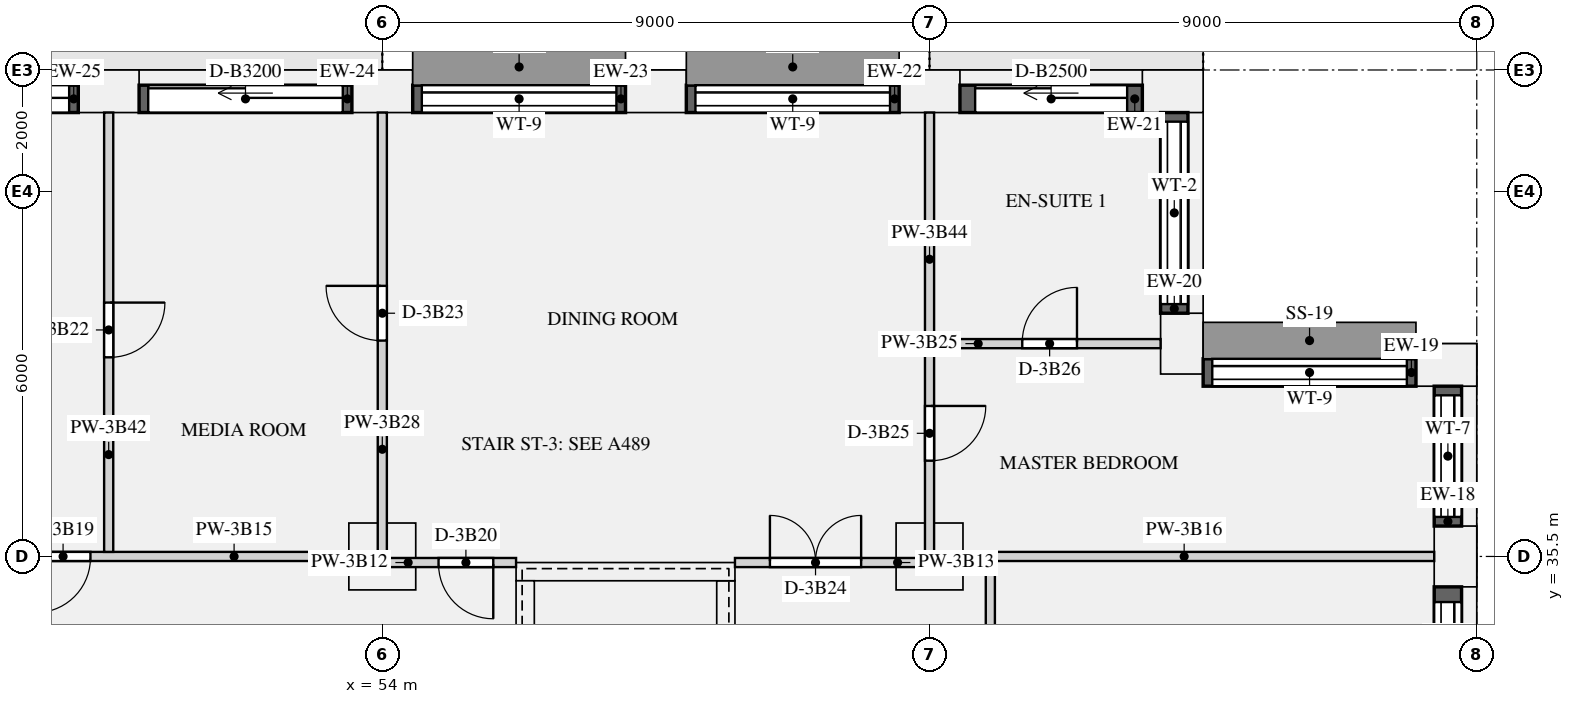
"""IFC4 building model, lengths in metres.
Left out: names, types, materials, properties, quantities, classifications, styles, units other than length and angle.
Written with IfcOpenShell. Run it as: python <this file> out.ifc"""

import sys

from ifc_helpers import new_model, si_unit, direction, frame, frame_2d, origin, origin_2d, place, context, subcontext, project, spatial, rectangle, extrude, element, fill, save


model = new_model("IFC4")
c1 = context("Model", 3, precision=1e-05, world=origin(), true_north=direction((0.0, 1.0)))
c2 = subcontext(c1, "Body", "Model", "MODEL_VIEW")
j1 = project(units=[si_unit("LENGTHUNIT", "METRE"), si_unit("PLANEANGLEUNIT", "RADIAN")], contexts=[c1])
p1 = place(None, origin())
s1 = spatial("IfcSite", under=j1, at=p1, CompositionType="ELEMENT")
p2 = place(p1, origin())
s2 = spatial("IfcBuilding", under=s1, at=p2, CompositionType="ELEMENT")
p3 = place(p2, frame((0.0, 0.0, 150.75)))
s3 = spatial("IfcBuildingStorey", under=s2, at=p3, CompositionType="ELEMENT", Elevation=150.75)
for number, where, z_axis, x_axis in (
    (1, (71.65, 35.5, 0.0), (0.0, 0.0, 1.0), (0.0, 1.0, 0.0)),
    (2, (71.5, 38.65, 0.0), (0.0, 0.0, 1.0), (-1.0, 0.0, 0.0)),
    (3, (67.15, 39.0, 0.0), (0.0, 0.0, 1.0), (0.0, 1.0, 0.0)),
    (4, (67.0, 43.15, 0.0), (0.0, 0.0, 1.0), (-1.0, 0.0, 0.0)),
    (5, (63.0, 43.15, 0.0), (0.0, 0.0, 1.0), (-1.0, 0.0, 0.0)),
    (6, (58.5, 43.15, 0.0), (0.0, 0.0, 1.0), (-1.0, 0.0, 0.0)),
    (7, (54.0, 43.15, 0.0), (0.0, 0.0, 1.0), (-1.0, 0.0, 0.0)),
    (8, (49.5, 43.15, 0.0), (0.0, 0.0, 1.0), (-1.0, 0.0, 0.0)),
):
    element("IfcColumn", number, at=place(p3, frame(where, z_axis=z_axis, x_axis=x_axis)), inside=s3, PredefinedType="USERDEFINED", context=c2, shape_type="SweptSolid", body=[
        extrude(rectangle(XDim=1.0, YDim=0.7, at=origin_2d()), origin(), (0.0, 0.0, 1.0), 3.15),
    ])
for number, where, z_axis, x_axis in (
    (9, (54.0, 35.5, 0.0), (0.0, 0.0, 1.0), (1.0, 0.0, 0.0)),
    (10, (63.0, 35.5, 0.0), (0.0, 0.0, 1.0), (1.0, 0.0, 0.0)),
):
    element("IfcColumn", number, at=place(p3, frame(where, z_axis=z_axis, x_axis=x_axis)), inside=s3, PredefinedType="COLUMN", context=c2, shape_type="SweptSolid", body=[
        extrude(rectangle(XDim=1.1, YDim=1.1, at=origin_2d()), origin(), (0.0, 0.0, 1.0), 3.15),
    ])
p4 = place(p3, frame((56.2, 35.25, 0.0), z_axis=(0.0, 0.0, 1.0), x_axis=(1.0, 0.0, 0.0)))
e11 = element("IfcWall", 11, at=p4, inside=s3, PredefinedType="SHEAR", context=c2, shape_type="SweptSolid", body=[
    extrude(rectangle(XDim=3.6, YDim=0.3, at=frame_2d((1.8, 0.0))), origin(), (0.0, 0.0, 1.0), 3.15),
])
for number, where, z_axis, x_axis in (
    (12, (56.35, 27.3, 0.0), (0.0, 0.0, 1.0), (0.0, 1.0, 0.0)),
    (13, (59.65, 27.3, 0.0), (0.0, 0.0, 1.0), (0.0, 1.0, 0.0)),
):
    element("IfcWall", number, at=place(p3, frame(where, z_axis=z_axis, x_axis=x_axis)), inside=s3, PredefinedType="SHEAR", context=c2, shape_type="SweptSolid", body=[
        extrude(rectangle(XDim=7.8, YDim=0.3, at=frame_2d((3.9, 0.0))), origin(), (0.0, 0.0, 1.0), 3.15),
    ])
p5 = place(p3, frame((71.525, 32.5, 0.9), z_axis=(0.0, 0.0, 1.0), x_axis=(0.0, 1.0, 0.0)))
e14 = element("IfcWall", 14, at=p5, inside=s3, PredefinedType="SOLIDWALL", context=c2, shape_type="SweptSolid", body=[
    extrude(rectangle(XDim=2.5, YDim=0.45, at=frame_2d((1.25, 0.0))), origin(), (0.0, 0.0, 1.0), 1.93),
])
p6 = place(p5, frame((0.25, 0.0, 0.15)))
e15 = element("IfcOpeningElement", 15, at=p6, cuts=e14, PredefinedType="OPENING", context=c2, shape_type="SweptSolid", body=[
    extrude(rectangle(XDim=2.0, YDim=1.5, at=frame_2d((1.0, 0.75))), frame((0.0, 0.235, 0.0), z_axis=(0.0, -1.0, 0.0), x_axis=(1.0, 0.0, 0.0)), (0.0, 0.0, 1.0), 0.47),
])
p7 = place(p3, frame((71.525, 36.0, 0.9), z_axis=(0.0, 0.0, 1.0), x_axis=(0.0, 1.0, 0.0)))
e16 = element("IfcWall", 16, at=p7, inside=s3, PredefinedType="SOLIDWALL", context=c2, shape_type="SweptSolid", body=[
    extrude(rectangle(XDim=2.3, YDim=0.45, at=frame_2d((1.15, 0.0))), origin(), (0.0, 0.0, 1.0), 1.93),
])
p8 = place(p7, frame((0.15, 0.0, 0.15)))
e17 = element("IfcOpeningElement", 17, at=p8, cuts=e16, PredefinedType="OPENING", context=c2, shape_type="SweptSolid", body=[
    extrude(rectangle(XDim=2.0, YDim=1.5, at=frame_2d((1.0, 0.75))), frame((0.0, 0.235, 0.0), z_axis=(0.0, -1.0, 0.0), x_axis=(1.0, 0.0, 0.0)), (0.0, 0.0, 1.0), 0.47),
])
p9 = place(p3, frame((71.0, 38.525, 0.9), z_axis=(0.0, 0.0, 1.0), x_axis=(-1.0, 0.0, 0.0)))
e18 = element("IfcWall", 18, at=p9, inside=s3, PredefinedType="SOLIDWALL", context=c2, shape_type="SweptSolid", body=[
    extrude(rectangle(XDim=3.5, YDim=0.45, at=frame_2d((1.75, 0.0))), origin(), (0.0, 0.0, 1.0), 1.93),
])
p10 = place(p9, frame((0.15, 0.0, 0.15)))
e19 = element("IfcOpeningElement", 19, at=p10, cuts=e18, PredefinedType="OPENING", context=c2, shape_type="SweptSolid", body=[
    extrude(rectangle(XDim=3.2, YDim=1.5, at=frame_2d((1.6, 0.75))), frame((0.0, 0.235, 0.0), z_axis=(0.0, -1.0, 0.0), x_axis=(1.0, 0.0, 0.0)), (0.0, 0.0, 1.0), 0.47),
])
p11 = place(p3, frame((67.025, 39.5, 0.9), z_axis=(0.0, 0.0, 1.0), x_axis=(0.0, 1.0, 0.0)))
e20 = element("IfcWall", 20, at=p11, inside=s3, PredefinedType="SOLIDWALL", context=c2, shape_type="SweptSolid", body=[
    extrude(rectangle(XDim=3.3, YDim=0.45, at=frame_2d((1.65, 0.0))), origin(), (0.0, 0.0, 1.0), 1.93),
])
p12 = place(p11, frame((0.15, 0.0, 0.15)))
e21 = element("IfcOpeningElement", 21, at=p12, cuts=e20, PredefinedType="OPENING", context=c2, shape_type="SweptSolid", body=[
    extrude(rectangle(XDim=3.0, YDim=1.5, at=frame_2d((1.5, 0.75))), frame((0.0, 0.235, 0.0), z_axis=(0.0, -1.0, 0.0), x_axis=(1.0, 0.0, 0.0)), (0.0, 0.0, 1.0), 0.47),
])
p13 = place(p3, frame((66.5, 43.025, 0.0), z_axis=(0.0, 0.0, 1.0), x_axis=(-1.0, 0.0, 0.0)))
e22 = element("IfcWall", 22, at=p13, inside=s3, PredefinedType="SOLIDWALL", context=c2, shape_type="SweptSolid", body=[
    extrude(rectangle(XDim=3.0, YDim=0.45, at=frame_2d((1.5, 0.0))), origin(), (0.0, 0.0, 1.0), 2.83),
])
p14 = place(p13, frame((0.25, 0.0, 0.0)))
e23 = element("IfcOpeningElement", 23, at=p14, cuts=e22, PredefinedType="OPENING", context=c2, shape_type="SweptSolid", body=[
    extrude(rectangle(XDim=2.5, YDim=2.3, at=frame_2d((1.25, 1.15))), frame((0.0, 0.235, 0.0), z_axis=(0.0, -1.0, 0.0), x_axis=(1.0, 0.0, 0.0)), (0.0, 0.0, 1.0), 0.47),
])
p15 = place(p3, frame((62.5, 43.025, 0.9), z_axis=(0.0, 0.0, 1.0), x_axis=(-1.0, 0.0, 0.0)))
e24 = element("IfcWall", 24, at=p15, inside=s3, PredefinedType="SOLIDWALL", context=c2, shape_type="SweptSolid", body=[
    extrude(rectangle(XDim=3.5, YDim=0.45, at=frame_2d((1.75, 0.0))), origin(), (0.0, 0.0, 1.0), 1.93),
])
p16 = place(p15, frame((0.15, 0.0, 0.15)))
e25 = element("IfcOpeningElement", 25, at=p16, cuts=e24, PredefinedType="OPENING", context=c2, shape_type="SweptSolid", body=[
    extrude(rectangle(XDim=3.2, YDim=1.5, at=frame_2d((1.6, 0.75))), frame((0.0, 0.235, 0.0), z_axis=(0.0, -1.0, 0.0), x_axis=(1.0, 0.0, 0.0)), (0.0, 0.0, 1.0), 0.47),
])
p17 = place(p3, frame((58.0, 43.025, 0.9), z_axis=(0.0, 0.0, 1.0), x_axis=(-1.0, 0.0, 0.0)))
e26 = element("IfcWall", 26, at=p17, inside=s3, PredefinedType="SOLIDWALL", context=c2, shape_type="SweptSolid", body=[
    extrude(rectangle(XDim=3.5, YDim=0.45, at=frame_2d((1.75, 0.0))), origin(), (0.0, 0.0, 1.0), 1.93),
])
p18 = place(p17, frame((0.15, 0.0, 0.15)))
e27 = element("IfcOpeningElement", 27, at=p18, cuts=e26, PredefinedType="OPENING", context=c2, shape_type="SweptSolid", body=[
    extrude(rectangle(XDim=3.2, YDim=1.5, at=frame_2d((1.6, 0.75))), frame((0.0, 0.235, 0.0), z_axis=(0.0, -1.0, 0.0), x_axis=(1.0, 0.0, 0.0)), (0.0, 0.0, 1.0), 0.47),
])
p19 = place(p3, frame((53.5, 43.025, 0.0), z_axis=(0.0, 0.0, 1.0), x_axis=(-1.0, 0.0, 0.0)))
e28 = element("IfcWall", 28, at=p19, inside=s3, PredefinedType="SOLIDWALL", context=c2, shape_type="SweptSolid", body=[
    extrude(rectangle(XDim=3.5, YDim=0.45, at=frame_2d((1.75, 0.0))), origin(), (0.0, 0.0, 1.0), 2.83),
])
p20 = place(p19, frame((0.15, 0.0, 0.0)))
e29 = element("IfcOpeningElement", 29, at=p20, cuts=e28, PredefinedType="OPENING", context=c2, shape_type="SweptSolid", body=[
    extrude(rectangle(XDim=3.2, YDim=2.3, at=frame_2d((1.6, 1.15))), frame((0.0, 0.235, 0.0), z_axis=(0.0, -1.0, 0.0), x_axis=(1.0, 0.0, 0.0)), (0.0, 0.0, 1.0), 0.47),
])
p21 = place(p3, frame((49.0, 43.025, 0.0), z_axis=(0.0, 0.0, 1.0), x_axis=(-1.0, 0.0, 0.0)))
e30 = element("IfcWall", 30, at=p21, inside=s3, PredefinedType="SOLIDWALL", context=c2, shape_type="SweptSolid", body=[
    extrude(rectangle(XDim=3.5, YDim=0.45, at=frame_2d((1.75, 0.0))), origin(), (0.0, 0.0, 1.0), 2.83),
])
p22 = place(p21, frame((0.15, 0.0, 0.0)))
e31 = element("IfcOpeningElement", 31, at=p22, cuts=e30, PredefinedType="OPENING", context=c2, shape_type="SweptSolid", body=[
    extrude(rectangle(XDim=3.2, YDim=2.3, at=frame_2d((1.6, 1.15))), frame((0.0, 0.235, 0.0), z_axis=(0.0, -1.0, 0.0), x_axis=(1.0, 0.0, 0.0)), (0.0, 0.0, 1.0), 0.47),
])
p23 = place(p3, frame((53.925, 35.4, 0.0), z_axis=(0.0, 0.0, 1.0), x_axis=(1.0, 0.0, 0.0)))
e32 = element("IfcWall", 32, at=p23, inside=s3, PredefinedType="PARTITIONING", context=c2, shape_type="SweptSolid", body=[
    extrude(rectangle(XDim=2.275, YDim=0.15, at=frame_2d((1.137, 0.0))), origin(), (0.0, 0.0, 1.0), 2.83),
])
p24 = place(p23, frame((1.0, 0.0, 0.0)))
e33 = element("IfcOpeningElement", 33, at=p24, cuts=e32, PredefinedType="OPENING", context=c2, shape_type="SweptSolid", body=[
    extrude(rectangle(XDim=0.9, YDim=2.1, at=frame_2d((0.45, 1.05))), frame((0.0, 0.085, 0.0), z_axis=(0.0, -1.0, 0.0), x_axis=(1.0, 0.0, 0.0)), (0.0, 0.0, 1.0), 0.17),
])
p25 = place(p3, frame((59.8, 35.4, 0.0), z_axis=(0.0, 0.0, 1.0), x_axis=(1.0, 0.0, 0.0)))
e34 = element("IfcWall", 34, at=p25, inside=s3, PredefinedType="PARTITIONING", context=c2, shape_type="SweptSolid", body=[
    extrude(rectangle(XDim=3.275, YDim=0.15, at=frame_2d((1.637, 0.0))), origin(), (0.0, 0.0, 1.0), 2.83),
])
p26 = place(p25, frame((0.575, 0.0, 0.0)))
e35 = element("IfcOpeningElement", 35, at=p26, cuts=e34, PredefinedType="OPENING", context=c2, shape_type="SweptSolid", body=[
    extrude(rectangle(XDim=1.5, YDim=2.1, at=frame_2d((0.75, 1.05))), frame((0.0, 0.085, 0.0), z_axis=(0.0, -1.0, 0.0), x_axis=(1.0, 0.0, 0.0)), (0.0, 0.0, 1.0), 0.17),
])
p27 = place(p3, frame((45.0, 35.5, 0.0), z_axis=(0.0, 0.0, 1.0), x_axis=(1.0, 0.0, 0.0)))
e36 = element("IfcWall", 36, at=p27, inside=s3, PredefinedType="PARTITIONING", context=c2, shape_type="SweptSolid", body=[
    extrude(rectangle(XDim=8.925, YDim=0.15, at=frame_2d((4.462, 0.0))), origin(), (0.0, 0.0, 1.0), 2.83),
])
p28 = place(p27, frame((3.3, 0.0, 0.0)))
e37 = element("IfcOpeningElement", 37, at=p28, cuts=e36, PredefinedType="OPENING", context=c2, shape_type="SweptSolid", body=[
    extrude(rectangle(XDim=0.9, YDim=2.1, at=frame_2d((0.45, 1.05))), frame((0.0, 0.085, 0.0), z_axis=(0.0, -1.0, 0.0), x_axis=(1.0, 0.0, 0.0)), (0.0, 0.0, 1.0), 0.17),
])
p29 = place(p27, frame((1.025, 0.0, 0.0)))
e38 = element("IfcOpeningElement", 38, at=p29, cuts=e36, PredefinedType="OPENING", context=c2, shape_type="SweptSolid", body=[
    extrude(rectangle(XDim=1.5, YDim=2.1, at=frame_2d((0.75, 1.05))), frame((0.0, 0.085, 0.0), z_axis=(0.0, -1.0, 0.0), x_axis=(1.0, 0.0, 0.0)), (0.0, 0.0, 1.0), 0.17),
])
p30 = place(p3, frame((63.075, 35.5, 0.0), z_axis=(0.0, 0.0, 1.0), x_axis=(1.0, 0.0, 0.0)))
e39 = element("IfcWall", 39, at=p30, inside=s3, PredefinedType="PARTITIONING", context=c2, shape_type="SweptSolid", body=[
    extrude(rectangle(XDim=8.225, YDim=0.15, at=frame_2d((4.113, 0.0))), origin(), (0.0, 0.0, 1.0), 2.83),
])
p31 = place(p3, frame((63.075, 39.0, 0.0), z_axis=(0.0, 0.0, 1.0), x_axis=(1.0, 0.0, 0.0)))
e40 = element("IfcWall", 40, at=p31, inside=s3, PredefinedType="PARTITIONING", context=c2, shape_type="SweptSolid", body=[
    extrude(rectangle(XDim=3.725, YDim=0.15, at=frame_2d((1.863, 0.0))), origin(), (0.0, 0.0, 1.0), 2.83),
])
p32 = place(p31, frame((1.45, 0.0, 0.0)))
e41 = element("IfcOpeningElement", 41, at=p32, cuts=e40, PredefinedType="OPENING", context=c2, shape_type="SweptSolid", body=[
    extrude(rectangle(XDim=0.9, YDim=2.1, at=frame_2d((0.45, 1.05))), frame((0.0, 0.085, 0.0), z_axis=(0.0, -1.0, 0.0), x_axis=(1.0, 0.0, 0.0)), (0.0, 0.0, 1.0), 0.17),
])
p33 = place(p3, frame((54.0, 35.475, 0.0), z_axis=(0.0, 0.0, 1.0), x_axis=(0.0, 1.0, 0.0)))
e42 = element("IfcWall", 42, at=p33, inside=s3, PredefinedType="PARTITIONING", context=c2, shape_type="SweptSolid", body=[
    extrude(rectangle(XDim=7.325, YDim=0.15, at=frame_2d((3.663, 0.0))), origin(), (0.0, 0.0, 1.0), 2.83),
])
p34 = place(p33, frame((3.575, 0.0, 0.0)))
e43 = element("IfcOpeningElement", 43, at=p34, cuts=e42, PredefinedType="OPENING", context=c2, shape_type="SweptSolid", body=[
    extrude(rectangle(XDim=0.9, YDim=2.1, at=frame_2d((0.45, 1.05))), frame((0.0, 0.085, 0.0), z_axis=(0.0, -1.0, 0.0), x_axis=(1.0, 0.0, 0.0)), (0.0, 0.0, 1.0), 0.17),
])
p35 = place(p3, frame((49.5, 35.575, 0.0), z_axis=(0.0, 0.0, 1.0), x_axis=(0.0, 1.0, 0.0)))
e44 = element("IfcWall", 44, at=p35, inside=s3, PredefinedType="PARTITIONING", context=c2, shape_type="SweptSolid", body=[
    extrude(rectangle(XDim=7.225, YDim=0.15, at=frame_2d((3.613, 0.0))), origin(), (0.0, 0.0, 1.0), 2.83),
])
p36 = place(p35, frame((3.2, 0.0, 0.0)))
e45 = element("IfcOpeningElement", 45, at=p36, cuts=e44, PredefinedType="OPENING", context=c2, shape_type="SweptSolid", body=[
    extrude(rectangle(XDim=0.9, YDim=2.1, at=frame_2d((0.45, 1.05))), frame((0.0, 0.085, 0.0), z_axis=(0.0, -1.0, 0.0), x_axis=(1.0, 0.0, 0.0)), (0.0, 0.0, 1.0), 0.17),
])
p37 = place(p3, frame((63.0, 35.475, 0.0), z_axis=(0.0, 0.0, 1.0), x_axis=(0.0, 1.0, 0.0)))
e46 = element("IfcWall", 46, at=p37, inside=s3, PredefinedType="PARTITIONING", context=c2, shape_type="SweptSolid", body=[
    extrude(rectangle(XDim=7.325, YDim=0.15, at=frame_2d((3.663, 0.0))), origin(), (0.0, 0.0, 1.0), 2.83),
])
p38 = place(p37, frame((1.6, 0.0, 0.0)))
e47 = element("IfcOpeningElement", 47, at=p38, cuts=e46, PredefinedType="OPENING", context=c2, shape_type="SweptSolid", body=[
    extrude(rectangle(XDim=0.9, YDim=2.1, at=frame_2d((0.45, 1.05))), frame((0.0, 0.085, 0.0), z_axis=(0.0, -1.0, 0.0), x_axis=(1.0, 0.0, 0.0)), (0.0, 0.0, 1.0), 0.17),
])
p39 = place(p3, frame((64.0, 12.575, 0.0), z_axis=(0.0, 0.0, 1.0), x_axis=(0.0, 1.0, 0.0)))
e48 = element("IfcWall", 48, at=p39, inside=s3, PredefinedType="PARTITIONING", context=c2, shape_type="SweptSolid", body=[
    extrude(rectangle(XDim=22.85, YDim=0.15, at=frame_2d((11.425, 0.0))), origin(), (0.0, 0.0, 1.0), 2.83),
])
p40 = place(p39, frame((16.55, 0.0, 0.0)))
e49 = element("IfcOpeningElement", 49, at=p40, cuts=e48, PredefinedType="OPENING", context=c2, shape_type="SweptSolid", body=[
    extrude(rectangle(XDim=1.5, YDim=2.1, at=frame_2d((0.75, 1.05))), frame((0.0, 0.085, 0.0), z_axis=(0.0, -1.0, 0.0), x_axis=(1.0, 0.0, 0.0)), (0.0, 0.0, 1.0), 0.17),
])
p41 = place(p39, frame((4.925, 0.0, 0.0)))
e50 = element("IfcOpeningElement", 50, at=p41, cuts=e48, PredefinedType="OPENING", context=c2, shape_type="SweptSolid", body=[
    extrude(rectangle(XDim=1.5, YDim=2.1, at=frame_2d((0.75, 1.05))), frame((0.0, 0.085, 0.0), z_axis=(0.0, -1.0, 0.0), x_axis=(1.0, 0.0, 0.0)), (0.0, 0.0, 1.0), 0.17),
])
p42 = place(p6, origin())
e51 = element("IfcWindow", 51, at=p42, inside=s3, PartitioningType="SINGLE_PANEL", PredefinedType="WINDOW", context=c2, shape_type="SweptSolid", body=[
    extrude(rectangle(XDim=2.0, YDim=1.5, at=frame_2d((1.0, 0.75))), frame((0.0, -0.065, 0.0), z_axis=(0.0, -1.0, 0.0), x_axis=(1.0, 0.0, 0.0)), (0.0, 0.0, 1.0), 0.06),
])
fill(e15, e51)
p43 = place(p8, origin())
e52 = element("IfcWindow", 52, at=p43, inside=s3, PartitioningType="SINGLE_PANEL", PredefinedType="WINDOW", context=c2, shape_type="SweptSolid", body=[
    extrude(rectangle(XDim=2.0, YDim=1.5, at=frame_2d((1.0, 0.75))), frame((0.0, -0.065, 0.0), z_axis=(0.0, -1.0, 0.0), x_axis=(1.0, 0.0, 0.0)), (0.0, 0.0, 1.0), 0.06),
])
fill(e17, e52)
p44 = place(p10, origin())
e53 = element("IfcWindow", 53, at=p44, inside=s3, PartitioningType="SINGLE_PANEL", PredefinedType="WINDOW", context=c2, shape_type="SweptSolid", body=[
    extrude(rectangle(XDim=3.2, YDim=1.5, at=frame_2d((1.6, 0.75))), frame((0.0, -0.065, 0.0), z_axis=(0.0, -1.0, 0.0), x_axis=(1.0, 0.0, 0.0)), (0.0, 0.0, 1.0), 0.06),
])
fill(e19, e53)
p45 = place(p12, origin())
e54 = element("IfcWindow", 54, at=p45, inside=s3, PartitioningType="SINGLE_PANEL", PredefinedType="WINDOW", context=c2, shape_type="SweptSolid", body=[
    extrude(rectangle(XDim=3.0, YDim=1.5, at=frame_2d((1.5, 0.75))), frame((0.0, -0.065, 0.0), z_axis=(0.0, -1.0, 0.0), x_axis=(1.0, 0.0, 0.0)), (0.0, 0.0, 1.0), 0.06),
])
fill(e21, e54)
p46 = place(p14, origin())
e55 = element("IfcDoor", 55, at=p46, inside=s3, OperationType="SLIDING_TO_LEFT", PredefinedType="DOOR", context=c2, shape_type="SweptSolid", body=[
    extrude(rectangle(XDim=2.5, YDim=2.3, at=frame_2d((1.25, 1.15))), frame((0.0, -0.07, 0.0), z_axis=(0.0, -1.0, 0.0), x_axis=(1.0, 0.0, 0.0)), (0.0, 0.0, 1.0), 0.05),
])
fill(e23, e55)
p47 = place(p16, origin())
e56 = element("IfcWindow", 56, at=p47, inside=s3, PartitioningType="SINGLE_PANEL", PredefinedType="WINDOW", context=c2, shape_type="SweptSolid", body=[
    extrude(rectangle(XDim=3.2, YDim=1.5, at=frame_2d((1.6, 0.75))), frame((0.0, -0.065, 0.0), z_axis=(0.0, -1.0, 0.0), x_axis=(1.0, 0.0, 0.0)), (0.0, 0.0, 1.0), 0.06),
])
fill(e25, e56)
p48 = place(p18, origin())
e57 = element("IfcWindow", 57, at=p48, inside=s3, PartitioningType="SINGLE_PANEL", PredefinedType="WINDOW", context=c2, shape_type="SweptSolid", body=[
    extrude(rectangle(XDim=3.2, YDim=1.5, at=frame_2d((1.6, 0.75))), frame((0.0, -0.065, 0.0), z_axis=(0.0, -1.0, 0.0), x_axis=(1.0, 0.0, 0.0)), (0.0, 0.0, 1.0), 0.06),
])
fill(e27, e57)
p49 = place(p20, origin())
e58 = element("IfcDoor", 58, at=p49, inside=s3, OperationType="SLIDING_TO_LEFT", PredefinedType="DOOR", context=c2, shape_type="SweptSolid", body=[
    extrude(rectangle(XDim=3.2, YDim=2.3, at=frame_2d((1.6, 1.15))), frame((0.0, -0.07, 0.0), z_axis=(0.0, -1.0, 0.0), x_axis=(1.0, 0.0, 0.0)), (0.0, 0.0, 1.0), 0.05),
])
fill(e29, e58)
p50 = place(p22, origin())
e59 = element("IfcDoor", 59, at=p50, inside=s3, OperationType="SLIDING_TO_LEFT", PredefinedType="DOOR", context=c2, shape_type="SweptSolid", body=[
    extrude(rectangle(XDim=3.2, YDim=2.3, at=frame_2d((1.6, 1.15))), frame((0.0, -0.07, 0.0), z_axis=(0.0, -1.0, 0.0), x_axis=(1.0, 0.0, 0.0)), (0.0, 0.0, 1.0), 0.05),
])
fill(e31, e59)
p51 = place(p28, frame((0.9, 0.0, 0.0), z_axis=(0.0, 0.0, 1.0), x_axis=(-1.0, 0.0, 0.0)))
e60 = element("IfcDoor", 60, at=p51, inside=s3, OperationType="SINGLE_SWING_RIGHT", PredefinedType="DOOR", context=c2, shape_type="SweptSolid", body=[
    extrude(rectangle(XDim=0.9, YDim=2.1, at=frame_2d((0.45, 1.05))), frame((0.0, 0.025, 0.0), z_axis=(0.0, -1.0, 0.0), x_axis=(1.0, 0.0, 0.0)), (0.0, 0.0, 1.0), 0.05),
])
fill(e37, e60)
p52 = place(p24, frame((0.9, 0.0, 0.0), z_axis=(0.0, 0.0, 1.0), x_axis=(-1.0, 0.0, 0.0)))
e61 = element("IfcDoor", 61, at=p52, inside=s3, OperationType="SINGLE_SWING_LEFT", PredefinedType="DOOR", context=c2, shape_type="SweptSolid", body=[
    extrude(rectangle(XDim=0.9, YDim=2.1, at=frame_2d((0.45, 1.05))), frame((0.0, 0.025, 0.0), z_axis=(0.0, -1.0, 0.0), x_axis=(1.0, 0.0, 0.0)), (0.0, 0.0, 1.0), 0.05),
])
fill(e33, e61)
p53 = place(p36, frame((0.9, 0.0, 0.0), z_axis=(0.0, 0.0, 1.0), x_axis=(-1.0, 0.0, 0.0)))
e62 = element("IfcDoor", 62, at=p53, inside=s3, OperationType="SINGLE_SWING_LEFT", PredefinedType="DOOR", context=c2, shape_type="SweptSolid", body=[
    extrude(rectangle(XDim=0.9, YDim=2.1, at=frame_2d((0.45, 1.05))), frame((0.0, 0.025, 0.0), z_axis=(0.0, -1.0, 0.0), x_axis=(1.0, 0.0, 0.0)), (0.0, 0.0, 1.0), 0.05),
])
fill(e45, e62)
p54 = place(p34, origin())
e63 = element("IfcDoor", 63, at=p54, inside=s3, OperationType="SINGLE_SWING_RIGHT", PredefinedType="DOOR", context=c2, shape_type="SweptSolid", body=[
    extrude(rectangle(XDim=0.9, YDim=2.1, at=frame_2d((0.45, 1.05))), frame((0.0, 0.025, 0.0), z_axis=(0.0, -1.0, 0.0), x_axis=(1.0, 0.0, 0.0)), (0.0, 0.0, 1.0), 0.05),
])
fill(e43, e63)
p55 = place(p26, origin())
e64 = element("IfcDoor", 64, at=p55, inside=s3, OperationType="DOUBLE_DOOR_SINGLE_SWING", PredefinedType="DOOR", context=c2, shape_type="SweptSolid", body=[
    extrude(rectangle(XDim=1.5, YDim=2.1, at=frame_2d((0.75, 1.05))), frame((0.0, 0.025, 0.0), z_axis=(0.0, -1.0, 0.0), x_axis=(1.0, 0.0, 0.0)), (0.0, 0.0, 1.0), 0.05),
])
fill(e35, e64)
p56 = place(p38, frame((0.9, 0.0, 0.0), z_axis=(0.0, 0.0, 1.0), x_axis=(-1.0, 0.0, 0.0)))
e65 = element("IfcDoor", 65, at=p56, inside=s3, OperationType="SINGLE_SWING_LEFT", PredefinedType="DOOR", context=c2, shape_type="SweptSolid", body=[
    extrude(rectangle(XDim=0.9, YDim=2.1, at=frame_2d((0.45, 1.05))), frame((0.0, 0.025, 0.0), z_axis=(0.0, -1.0, 0.0), x_axis=(1.0, 0.0, 0.0)), (0.0, 0.0, 1.0), 0.05),
])
fill(e47, e65)
p57 = place(p32, origin())
e66 = element("IfcDoor", 66, at=p57, inside=s3, OperationType="SINGLE_SWING_RIGHT", PredefinedType="DOOR", context=c2, shape_type="SweptSolid", body=[
    extrude(rectangle(XDim=0.9, YDim=2.1, at=frame_2d((0.45, 1.05))), frame((0.0, 0.025, 0.0), z_axis=(0.0, -1.0, 0.0), x_axis=(1.0, 0.0, 0.0)), (0.0, 0.0, 1.0), 0.05),
])
fill(e41, e66)
save(model, sys.argv[1])
